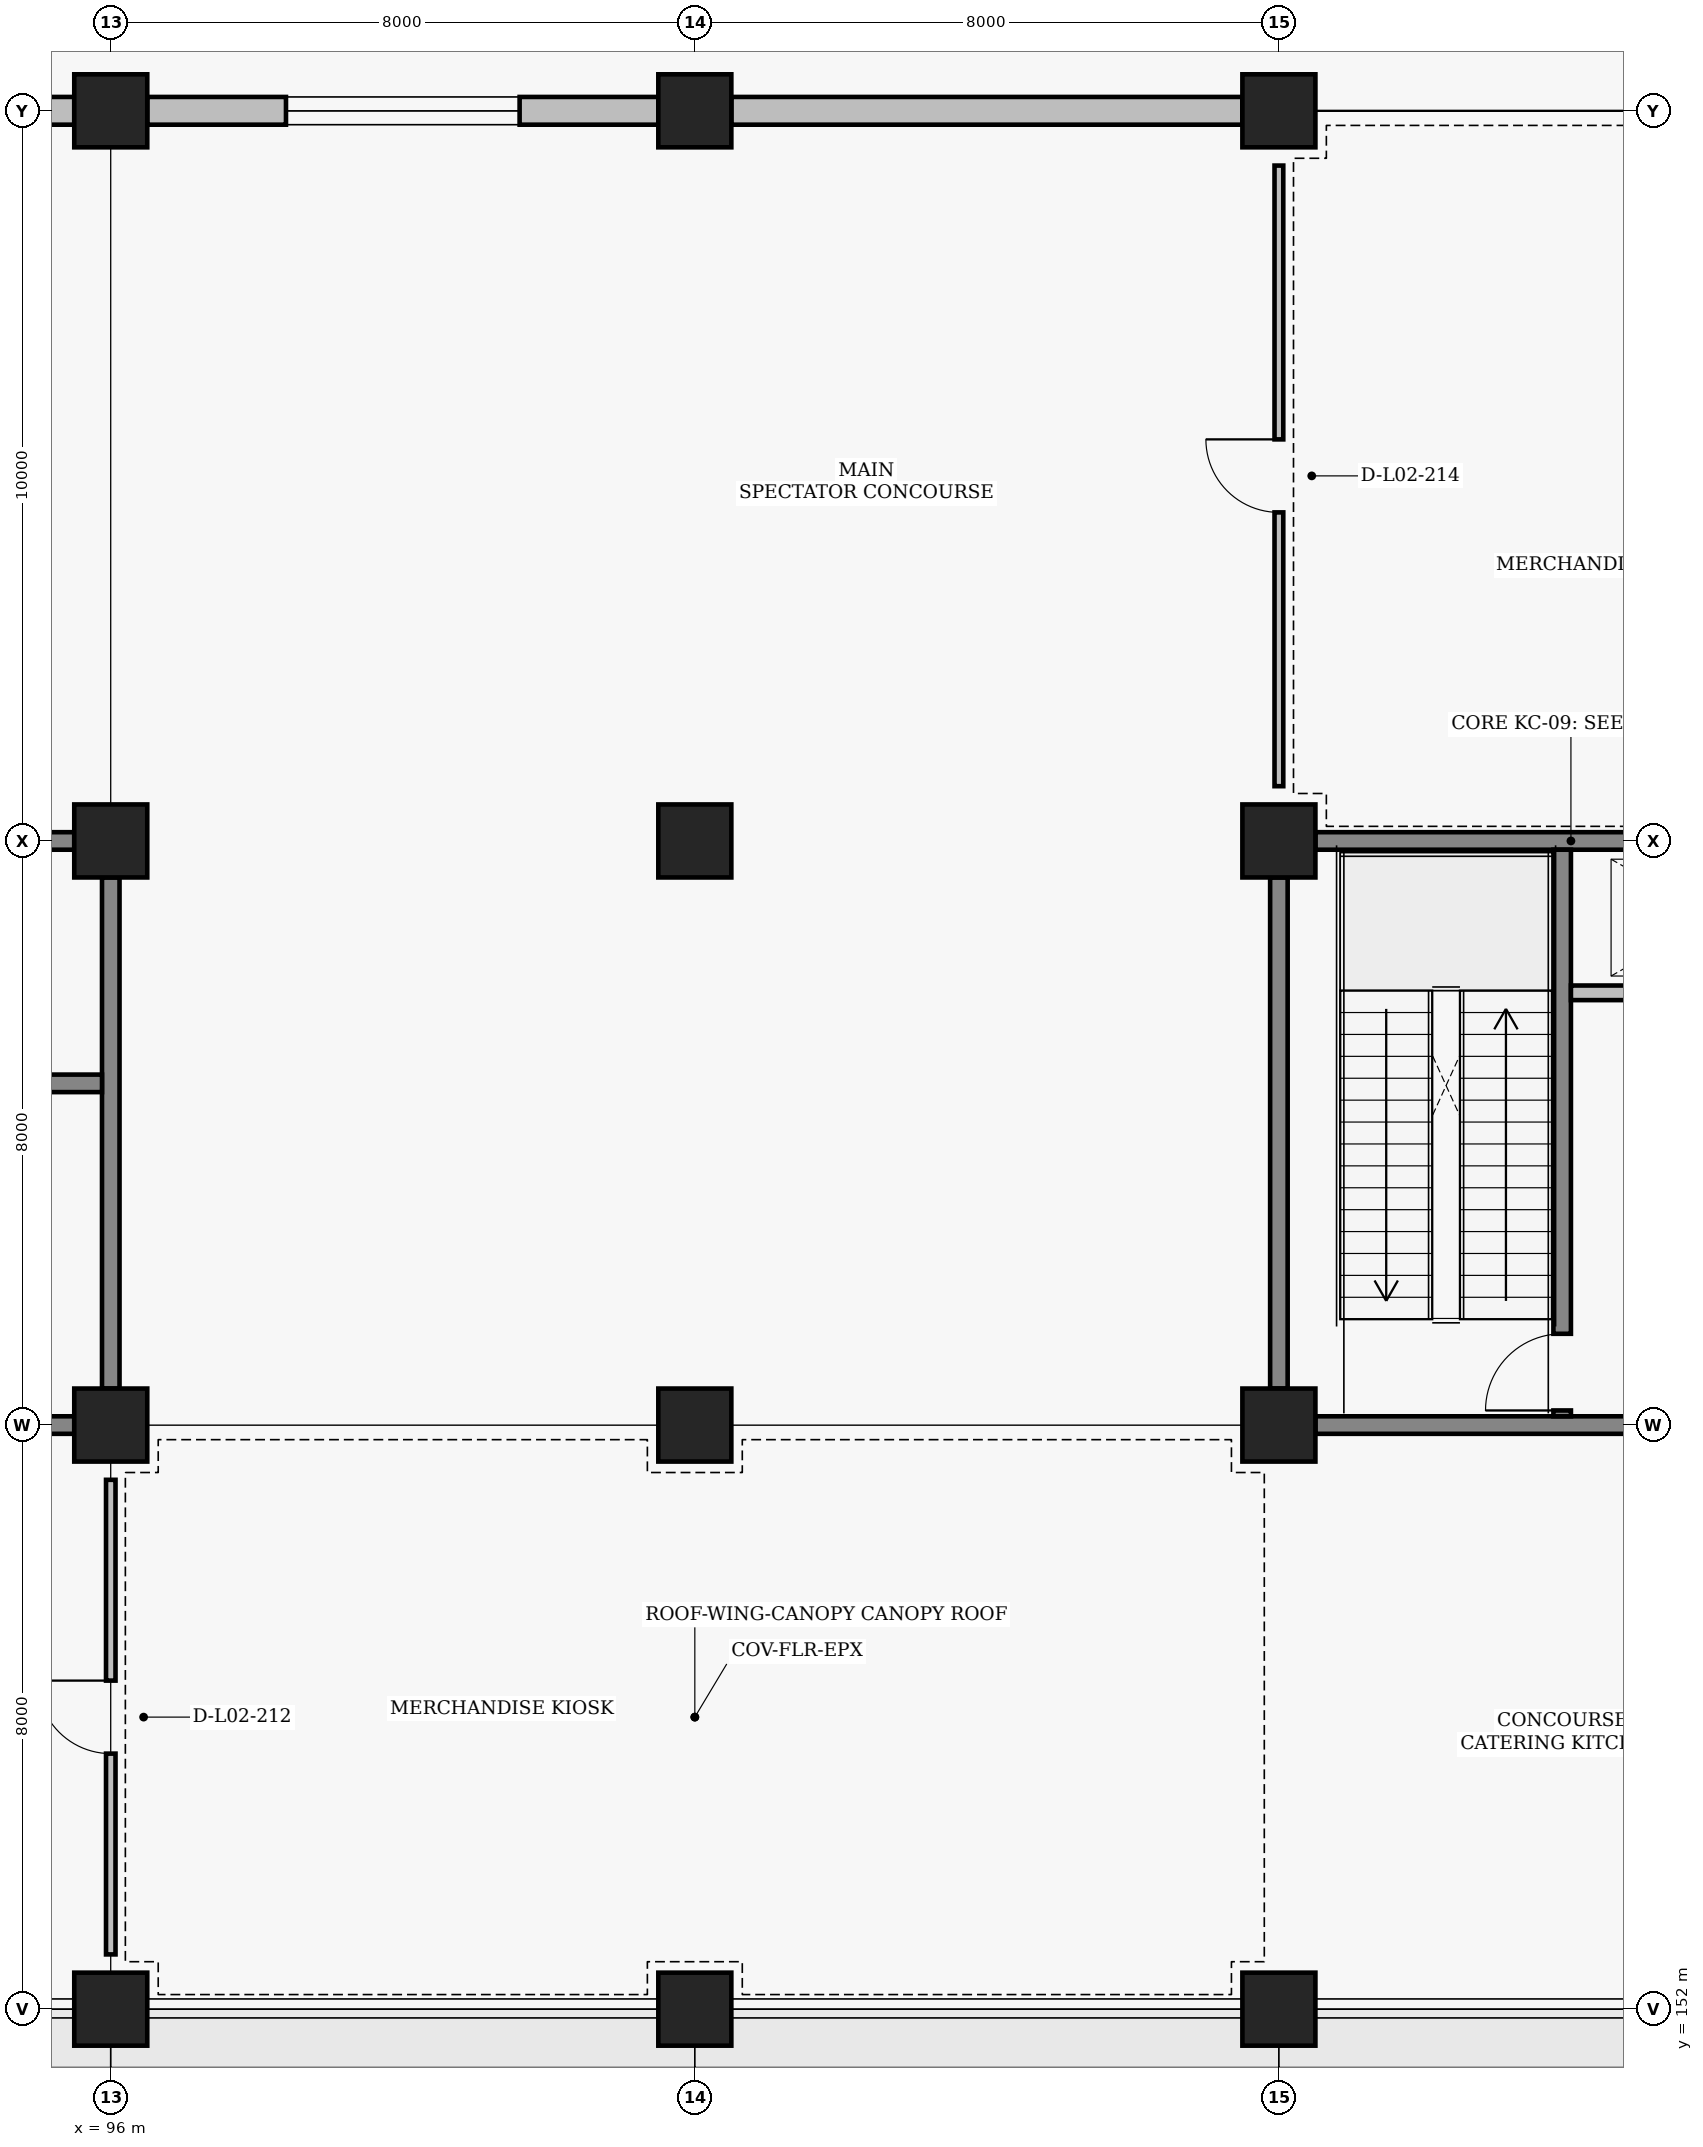
"""IFC4 building model, lengths in metres.
Left out: names, types, materials, properties, quantities, classifications, styles, units other than length and angle.
Written with IfcOpenShell. Run it as: python <this file> out.ifc"""

import sys

from ifc_helpers import new_model, si_unit, direction, frame, frame_2d, origin, origin_2d, place, context, subcontext, project, spatial, rectangle, extrude, element, fill, save


model = new_model("IFC4")
c1 = context("Model", 3, precision=1e-05, world=origin(), true_north=direction((0.0, 1.0)))
c2 = subcontext(c1, "Body", "Model", "MODEL_VIEW")
j1 = project(units=[si_unit("LENGTHUNIT", "METRE"), si_unit("PLANEANGLEUNIT", "RADIAN")], contexts=[c1])
p1 = place(None, origin())
s1 = spatial("IfcSite", under=j1, at=p1, CompositionType="ELEMENT")
p2 = place(p1, origin())
s2 = spatial("IfcBuilding", under=s1, at=p2, CompositionType="ELEMENT")
p3 = place(p2, frame((0.0, 0.0, 4.8)))
s3 = spatial("IfcBuildingStorey", under=s2, at=p3, CompositionType="ELEMENT", Elevation=4.8)
for number, where, z_axis, x_axis in (
    (1, (96.0, 152.0, 0.0), (0.0, 0.0, 1.0), (1.0, 0.0, 0.0)),
    (2, (96.0, 160.0, 0.0), (0.0, 0.0, 1.0), (1.0, 0.0, 0.0)),
    (3, (96.0, 168.0, 0.0), (0.0, 0.0, 1.0), (1.0, 0.0, 0.0)),
    (4, (96.0, 178.0, 0.0), (0.0, 0.0, 1.0), (1.0, 0.0, 0.0)),
    (5, (104.0, 152.0, 0.0), (0.0, 0.0, 1.0), (1.0, 0.0, 0.0)),
    (6, (104.0, 160.0, 0.0), (0.0, 0.0, 1.0), (1.0, 0.0, 0.0)),
    (7, (104.0, 168.0, 0.0), (0.0, 0.0, 1.0), (1.0, 0.0, 0.0)),
    (8, (104.0, 178.0, 0.0), (0.0, 0.0, 1.0), (1.0, 0.0, 0.0)),
    (9, (112.0, 152.0, 0.0), (0.0, 0.0, 1.0), (1.0, 0.0, 0.0)),
    (10, (112.0, 160.0, 0.0), (0.0, 0.0, 1.0), (1.0, 0.0, 0.0)),
    (11, (112.0, 168.0, 0.0), (0.0, 0.0, 1.0), (1.0, 0.0, 0.0)),
    (12, (112.0, 178.0, 0.0), (0.0, 0.0, 1.0), (1.0, 0.0, 0.0)),
):
    element("IfcColumn", number, at=place(p3, frame(where, z_axis=z_axis, x_axis=x_axis)), inside=s3, PredefinedType="COLUMN", context=c2, shape_type="SweptSolid", body=[
        extrude(rectangle(XDim=1.0, YDim=1.0, at=origin_2d()), origin(), (0.0, 0.0, 1.0), 4.8),
    ])
p4 = place(p3, frame((88.5, 178.0, 0.0), z_axis=(0.0, 0.0, 1.0), x_axis=(1.0, 0.0, 0.0)))
e13 = element("IfcWall", 13, at=p4, inside=s3, PredefinedType="SOLIDWALL", context=c2, shape_type="SweptSolid", body=[
    extrude(rectangle(XDim=7.0, YDim=0.38, at=frame_2d((3.5, 0.0))), origin(), (0.0, 0.0, 1.0), 3.77),
])
p5 = place(p3, frame((96.5, 178.0, 0.0), z_axis=(0.0, 0.0, 1.0), x_axis=(1.0, 0.0, 0.0)))
e14 = element("IfcWall", 14, at=p5, inside=s3, PredefinedType="SOLIDWALL", context=c2, shape_type="SweptSolid", body=[
    extrude(rectangle(XDim=7.0, YDim=0.38, at=frame_2d((3.5, 0.0))), origin(), (0.0, 0.0, 1.0), 3.77),
])
p6 = place(p5, frame((1.9, 0.0, 1.9)))
e15 = element("IfcOpeningElement", 15, at=p6, cuts=e14, PredefinedType="OPENING", context=c2, shape_type="SweptSolid", body=[
    extrude(rectangle(XDim=3.2, YDim=1.1, at=frame_2d((1.6, 0.55))), frame((0.0, 0.2, 0.0), z_axis=(0.0, -1.0, 0.0), x_axis=(1.0, 0.0, 0.0)), (0.0, 0.0, 1.0), 0.4),
])
p7 = place(p3, frame((104.5, 178.0, 0.0), z_axis=(0.0, 0.0, 1.0), x_axis=(1.0, 0.0, 0.0)))
e16 = element("IfcWall", 16, at=p7, inside=s3, PredefinedType="SOLIDWALL", context=c2, shape_type="SweptSolid", body=[
    extrude(rectangle(XDim=7.0, YDim=0.38, at=frame_2d((3.5, 0.0))), origin(), (0.0, 0.0, 1.0), 3.77),
])
p8 = place(p3, frame((88.5, 160.0, 0.0), z_axis=(0.0, 0.0, 1.0), x_axis=(1.0, 0.0, 0.0)))
e17 = element("IfcWall", 17, at=p8, inside=s3, PredefinedType="SHEAR", context=c2, shape_type="SweptSolid", body=[
    extrude(rectangle(XDim=7.0, YDim=0.24, at=frame_2d((3.5, 0.0))), origin(), (0.0, 0.0, 1.0), 3.61),
])
p9 = place(p8, frame((4.85, 0.0, 0.0)))
e18 = element("IfcOpeningElement", 18, at=p9, cuts=e17, PredefinedType="OPENING", context=c2, shape_type="SweptSolid", body=[
    extrude(rectangle(XDim=1.1, YDim=2.2, at=frame_2d((0.55, 1.1))), frame((0.0, 0.13, 0.0), z_axis=(0.0, -1.0, 0.0), x_axis=(1.0, 0.0, 0.0)), (0.0, 0.0, 1.0), 0.26),
])
for number, where, z_axis, x_axis in (
    (19, (88.5, 168.0, 0.0), (0.0, 0.0, 1.0), (1.0, 0.0, 0.0)),
    (20, (96.0, 160.5, 0.0), (0.0, 0.0, 1.0), (0.0, 1.0, 0.0)),
):
    element("IfcWall", number, at=place(p3, frame(where, z_axis=z_axis, x_axis=x_axis)), inside=s3, PredefinedType="SHEAR", context=c2, shape_type="SweptSolid", body=[
        extrude(rectangle(XDim=7.0, YDim=0.24, at=frame_2d((3.5, 0.0))), origin(), (0.0, 0.0, 1.0), 3.77),
    ])
p10 = place(p3, frame((92.0, 164.68, 0.0), z_axis=(0.0, 0.0, 1.0), x_axis=(1.0, 0.0, 0.0)))
e21 = element("IfcWall", 21, at=p10, inside=s3, PredefinedType="SHEAR", context=c2, shape_type="SweptSolid", body=[
    extrude(rectangle(XDim=3.88, YDim=0.24, at=frame_2d((1.94, 0.0))), origin(), (0.0, 0.0, 1.0), 3.91),
])
p11 = place(p10, frame((1.0, 0.0, 0.0)))
e22 = element("IfcOpeningElement", 22, at=p11, cuts=e21, PredefinedType="OPENING", context=c2, shape_type="SweptSolid", body=[
    extrude(rectangle(XDim=1.1, YDim=2.15, at=frame_2d((0.55, 1.075))), frame((0.0, 0.13, 0.0), z_axis=(0.0, -1.0, 0.0), x_axis=(1.0, 0.0, 0.0)), (0.0, 0.0, 1.0), 0.26),
])
p12 = place(p3, frame((112.5, 160.0, 0.0), z_axis=(0.0, 0.0, 1.0), x_axis=(1.0, 0.0, 0.0)))
e23 = element("IfcWall", 23, at=p12, inside=s3, PredefinedType="SHEAR", context=c2, shape_type="SweptSolid", body=[
    extrude(rectangle(XDim=7.0, YDim=0.24, at=frame_2d((3.5, 0.0))), origin(), (0.0, 0.0, 1.0), 3.91),
])
p13 = place(p12, frame((4.85, 0.0, 0.0)))
e24 = element("IfcOpeningElement", 24, at=p13, cuts=e23, PredefinedType="OPENING", context=c2, shape_type="SweptSolid", body=[
    extrude(rectangle(XDim=1.1, YDim=2.2, at=frame_2d((0.55, 1.1))), frame((0.0, 0.13, 0.0), z_axis=(0.0, -1.0, 0.0), x_axis=(1.0, 0.0, 0.0)), (0.0, 0.0, 1.0), 0.26),
])
p14 = place(p3, frame((112.5, 168.0, 0.0), z_axis=(0.0, 0.0, 1.0), x_axis=(1.0, 0.0, 0.0)))
e25 = element("IfcWall", 25, at=p14, inside=s3, PredefinedType="SHEAR", context=c2, shape_type="SweptSolid", body=[
    extrude(rectangle(XDim=7.0, YDim=0.24, at=frame_2d((3.5, 0.0))), origin(), (0.0, 0.0, 1.0), 3.61),
])
p15 = place(p3, frame((112.0, 160.5, 0.0), z_axis=(0.0, 0.0, 1.0), x_axis=(0.0, 1.0, 0.0)))
e26 = element("IfcWall", 26, at=p15, inside=s3, PredefinedType="SHEAR", context=c2, shape_type="SweptSolid", body=[
    extrude(rectangle(XDim=7.0, YDim=0.24, at=frame_2d((3.5, 0.0))), origin(), (0.0, 0.0, 1.0), 3.77),
])
p16 = place(p3, frame((115.88, 160.12, 0.0), z_axis=(0.0, 0.0, 1.0), x_axis=(0.0, 1.0, 0.0)))
e27 = element("IfcWall", 27, at=p16, inside=s3, PredefinedType="SHEAR", context=c2, shape_type="SweptSolid", body=[
    extrude(rectangle(XDim=7.76, YDim=0.24, at=frame_2d((3.88, 0.0))), origin(), (0.0, 0.0, 1.0), 4.01),
])
p17 = place(p16, frame((0.08, 0.0, 0.0)))
e28 = element("IfcOpeningElement", 28, at=p17, cuts=e27, PredefinedType="OPENING", context=c2, shape_type="SweptSolid", body=[
    extrude(rectangle(XDim=1.05, YDim=2.15, at=frame_2d((0.525, 1.075))), frame((0.0, 0.13, 0.0), z_axis=(0.0, -1.0, 0.0), x_axis=(1.0, 0.0, 0.0)), (0.0, 0.0, 1.0), 0.26),
])
p18 = place(p3, frame((116.0, 165.92, 0.0), z_axis=(0.0, 0.0, 1.0), x_axis=(1.0, 0.0, 0.0)))
e29 = element("IfcWall", 29, at=p18, inside=s3, PredefinedType="PARTITIONING", context=c2, shape_type="SweptSolid", body=[
    extrude(rectangle(XDim=3.88, YDim=0.2, at=frame_2d((1.94, 0.0))), origin(), (0.0, 0.0, 1.0), 3.91),
])
p19 = place(p18, frame((1.25, 0.0, 0.0)))
e30 = element("IfcOpeningElement", 30, at=p19, cuts=e29, PredefinedType="OPENING", context=c2, shape_type="SweptSolid", body=[
    extrude(rectangle(XDim=0.85, YDim=2.05, at=frame_2d((0.425, 1.025))), frame((0.0, 0.11, 0.0), z_axis=(0.0, -1.0, 0.0), x_axis=(1.0, 0.0, 0.0)), (0.0, 0.0, 1.0), 0.22),
])
p20 = place(p3, frame((96.0, 152.75, 0.0), z_axis=(0.0, 0.0, 1.0), x_axis=(0.0, 1.0, 0.0)))
e31 = element("IfcWall", 31, at=p20, inside=s3, PredefinedType="PARTITIONING", context=c2, shape_type="SweptSolid", body=[
    extrude(rectangle(XDim=6.5, YDim=0.13, at=frame_2d((3.25, 0.0))), origin(), (0.0, 0.0, 1.0), 3.91),
])
p21 = place(p20, frame((2.75, 0.0, 0.0)))
e32 = element("IfcOpeningElement", 32, at=p21, cuts=e31, PredefinedType="OPENING", context=c2, shape_type="SweptSolid", body=[
    extrude(rectangle(XDim=1.0, YDim=2.1, at=frame_2d((0.5, 1.05))), frame((0.0, 0.075, 0.0), z_axis=(0.0, -1.0, 0.0), x_axis=(1.0, 0.0, 0.0)), (0.0, 0.0, 1.0), 0.15),
])
p22 = place(p3, frame((112.0, 168.75, 0.0), z_axis=(0.0, 0.0, 1.0), x_axis=(0.0, 1.0, 0.0)))
e33 = element("IfcWall", 33, at=p22, inside=s3, PredefinedType="PARTITIONING", context=c2, shape_type="SweptSolid", body=[
    extrude(rectangle(XDim=8.5, YDim=0.12, at=frame_2d((4.25, 0.0))), origin(), (0.0, 0.0, 1.0), 3.77),
])
p23 = place(p22, frame((3.75, 0.0, 0.0)))
e34 = element("IfcOpeningElement", 34, at=p23, cuts=e33, PredefinedType="OPENING", context=c2, shape_type="SweptSolid", body=[
    extrude(rectangle(XDim=1.0, YDim=2.1, at=frame_2d((0.5, 1.05))), frame((0.0, 0.07, 0.0), z_axis=(0.0, -1.0, 0.0), x_axis=(1.0, 0.0, 0.0)), (0.0, 0.0, 1.0), 0.14),
])
p24 = place(p6, origin())
e35 = element("IfcWindow", 35, at=p24, inside=s3, PartitioningType="SINGLE_PANEL", PredefinedType="LIGHTDOME", context=c2, shape_type="SweptSolid", body=[
    extrude(rectangle(XDim=3.2, YDim=1.1, at=frame_2d((1.6, 0.55))), frame((0.0, 0.03, 0.0), z_axis=(0.0, -1.0, 0.0), x_axis=(1.0, 0.0, 0.0)), (0.0, 0.0, 1.0), 0.06),
])
fill(e15, e35)
p25 = place(p17, origin())
e36 = element("IfcDoor", 36, at=p25, inside=s3, OperationType="SINGLE_SWING_LEFT", PredefinedType="DOOR", context=c2, shape_type="SweptSolid", body=[
    extrude(rectangle(XDim=1.05, YDim=2.15, at=frame_2d((0.525, 1.075))), frame((0.0, 0.025, 0.0), z_axis=(0.0, -1.0, 0.0), x_axis=(1.0, 0.0, 0.0)), (0.0, 0.0, 1.0), 0.05),
])
fill(e28, e36)
p26 = place(p21, origin())
e37 = element("IfcDoor", 37, at=p26, inside=s3, OperationType="SINGLE_SWING_RIGHT", PredefinedType="DOOR", context=c2, shape_type="SweptSolid", body=[
    extrude(rectangle(XDim=1.0, YDim=2.1, at=frame_2d((0.5, 1.05))), frame((0.0, 0.025, 0.0), z_axis=(0.0, -1.0, 0.0), x_axis=(1.0, 0.0, 0.0)), (0.0, 0.0, 1.0), 0.05),
])
fill(e32, e37)
p27 = place(p23, origin())
e38 = element("IfcDoor", 38, at=p27, inside=s3, OperationType="SINGLE_SWING_RIGHT", PredefinedType="DOOR", context=c2, shape_type="SweptSolid", body=[
    extrude(rectangle(XDim=1.0, YDim=2.1, at=frame_2d((0.5, 1.05))), frame((0.0, 0.025, 0.0), z_axis=(0.0, -1.0, 0.0), x_axis=(1.0, 0.0, 0.0)), (0.0, 0.0, 1.0), 0.05),
])
fill(e34, e38)
save(model, sys.argv[1])
